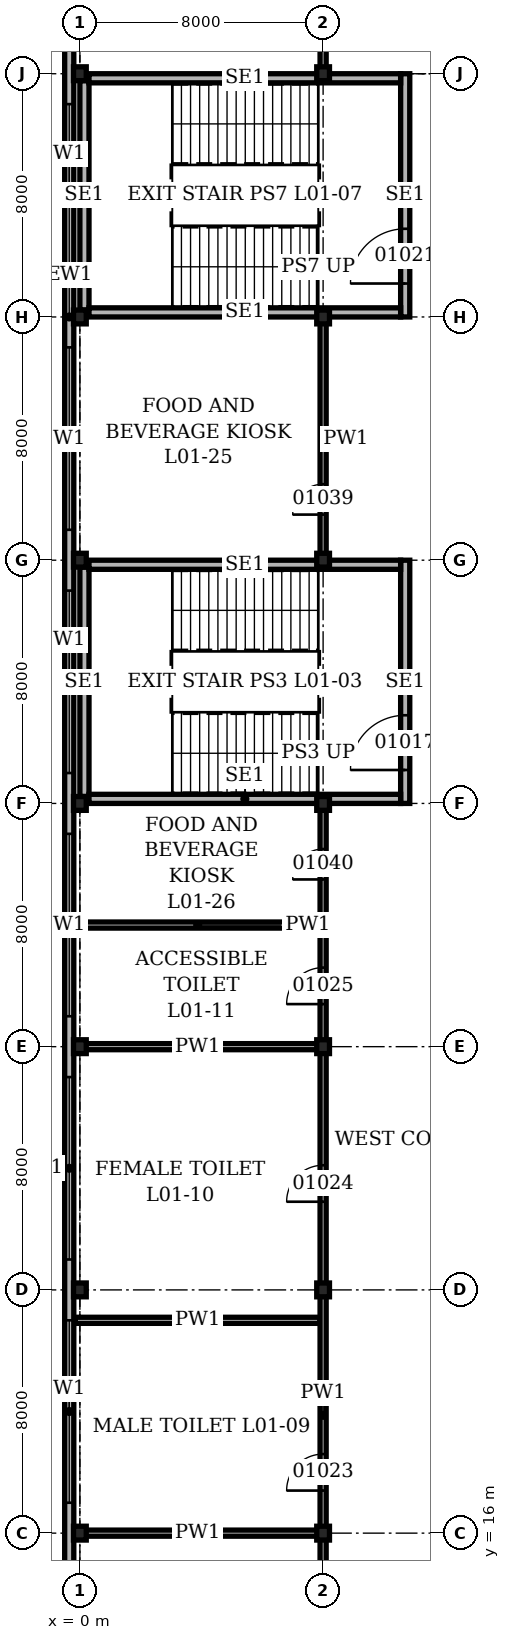
"""IFC4 building model, lengths in metres.
Left out: names, types, materials, properties, quantities, classifications, styles, units other than length and angle.
Written with IfcOpenShell. Run it as: python <this file> out.ifc"""

import sys

from ifc_helpers import new_model, si_unit, direction, frame, frame_2d, origin, origin_2d, place, context, subcontext, project, spatial, rectangle, i_section, extrude, element, fill, save


model = new_model("IFC4")
c1 = context("Model", 3, precision=1e-05, world=origin(), true_north=direction((0.0, 1.0)))
c2 = subcontext(c1, "Body", "Model", "MODEL_VIEW")
j1 = project(units=[si_unit("LENGTHUNIT", "METRE"), si_unit("PLANEANGLEUNIT", "RADIAN")], contexts=[c1])
p1 = place(None, origin())
s1 = spatial("IfcSite", under=j1, at=p1, CompositionType="ELEMENT")
p2 = place(p1, origin())
s2 = spatial("IfcBuilding", under=s1, at=p2, CompositionType="ELEMENT")
p3 = place(p2, frame((0.0, 0.0, 4.9)))
s3 = spatial("IfcBuildingStorey", under=s2, at=p3, CompositionType="ELEMENT", Elevation=4.9)
for number, where, z_axis, x_axis in (
    (1, (0.0, 16.0, 0.0), (0.0, 0.0, 1.0), (1.0, 0.0, 0.0)),
    (2, (0.0, 24.0, 0.0), (0.0, 0.0, 1.0), (1.0, 0.0, 0.0)),
    (3, (0.0, 32.0, 0.0), (0.0, 0.0, 1.0), (1.0, 0.0, 0.0)),
    (4, (0.0, 40.0, 0.0), (0.0, 0.0, 1.0), (1.0, 0.0, 0.0)),
    (5, (0.0, 48.0, 0.0), (0.0, 0.0, 1.0), (1.0, 0.0, 0.0)),
    (6, (0.0, 56.0, 0.0), (0.0, 0.0, 1.0), (1.0, 0.0, 0.0)),
    (7, (0.0, 64.0, 0.0), (0.0, 0.0, 1.0), (1.0, 0.0, 0.0)),
    (8, (8.0, 16.0, 0.0), (0.0, 0.0, 1.0), (1.0, 0.0, 0.0)),
    (9, (8.0, 24.0, 0.0), (0.0, 0.0, 1.0), (1.0, 0.0, 0.0)),
    (10, (8.0, 32.0, 0.0), (0.0, 0.0, 1.0), (1.0, 0.0, 0.0)),
    (11, (8.0, 40.0, 0.0), (0.0, 0.0, 1.0), (1.0, 0.0, 0.0)),
    (12, (8.0, 48.0, 0.0), (0.0, 0.0, 1.0), (1.0, 0.0, 0.0)),
    (13, (8.0, 56.0, 0.0), (0.0, 0.0, 1.0), (1.0, 0.0, 0.0)),
    (14, (8.0, 64.0, 0.0), (0.0, 0.0, 1.0), (1.0, 0.0, 0.0)),
):
    element("IfcColumn", number, at=place(p3, frame(where, z_axis=z_axis, x_axis=x_axis)), inside=s3, PredefinedType="COLUMN", context=c2, shape_type="SweptSolid", body=[
        extrude(i_section(OverallWidth=0.419, OverallDepth=0.455, WebThickness=0.042, FlangeThickness=0.068, at=origin_2d()), origin(), (0.0, 0.0, 1.0), 5.0),
    ])
p4 = place(p3, frame((-0.35, 112.35, 0.0), z_axis=(0.0, 0.0, 1.0), x_axis=(0.0, -1.0, 0.0)))
e15 = element("IfcWall", 15, at=p4, inside=s3, PredefinedType="SOLIDWALL", context=c2, shape_type="SweptSolid", body=[
    extrude(rectangle(XDim=112.7, YDim=0.3, at=frame_2d((56.35, 0.0))), origin(), (0.0, 0.0, 1.0), 5.0),
])
p5 = place(p4, frame((1.35, 0.0, 1.0)))
e16 = element("IfcOpeningElement", 16, at=p5, cuts=e15, PredefinedType="OPENING", context=c2, shape_type="SweptSolid", body=[
    extrude(rectangle(XDim=6.0, YDim=1.5, at=frame_2d((3.0, 0.75))), frame((0.0, 0.16, 0.0), z_axis=(0.0, -1.0, 0.0), x_axis=(1.0, 0.0, 0.0)), (0.0, 0.0, 1.0), 0.32),
])
p6 = place(p4, frame((9.35, 0.0, 1.0)))
e17 = element("IfcOpeningElement", 17, at=p6, cuts=e15, PredefinedType="OPENING", context=c2, shape_type="SweptSolid", body=[
    extrude(rectangle(XDim=6.0, YDim=1.5, at=frame_2d((3.0, 0.75))), frame((0.0, 0.16, 0.0), z_axis=(0.0, -1.0, 0.0), x_axis=(1.0, 0.0, 0.0)), (0.0, 0.0, 1.0), 0.32),
])
p7 = place(p4, frame((17.35, 0.0, 1.0)))
e18 = element("IfcOpeningElement", 18, at=p7, cuts=e15, PredefinedType="OPENING", context=c2, shape_type="SweptSolid", body=[
    extrude(rectangle(XDim=6.0, YDim=1.5, at=frame_2d((3.0, 0.75))), frame((0.0, 0.16, 0.0), z_axis=(0.0, -1.0, 0.0), x_axis=(1.0, 0.0, 0.0)), (0.0, 0.0, 1.0), 0.32),
])
p8 = place(p4, frame((25.35, 0.0, 1.0)))
e19 = element("IfcOpeningElement", 19, at=p8, cuts=e15, PredefinedType="OPENING", context=c2, shape_type="SweptSolid", body=[
    extrude(rectangle(XDim=6.0, YDim=1.5, at=frame_2d((3.0, 0.75))), frame((0.0, 0.16, 0.0), z_axis=(0.0, -1.0, 0.0), x_axis=(1.0, 0.0, 0.0)), (0.0, 0.0, 1.0), 0.32),
])
p9 = place(p4, frame((33.35, 0.0, 1.0)))
e20 = element("IfcOpeningElement", 20, at=p9, cuts=e15, PredefinedType="OPENING", context=c2, shape_type="SweptSolid", body=[
    extrude(rectangle(XDim=6.0, YDim=1.5, at=frame_2d((3.0, 0.75))), frame((0.0, 0.16, 0.0), z_axis=(0.0, -1.0, 0.0), x_axis=(1.0, 0.0, 0.0)), (0.0, 0.0, 1.0), 0.32),
])
p10 = place(p4, frame((41.35, 0.0, 1.0)))
e21 = element("IfcOpeningElement", 21, at=p10, cuts=e15, PredefinedType="OPENING", context=c2, shape_type="SweptSolid", body=[
    extrude(rectangle(XDim=6.0, YDim=1.5, at=frame_2d((3.0, 0.75))), frame((0.0, 0.16, 0.0), z_axis=(0.0, -1.0, 0.0), x_axis=(1.0, 0.0, 0.0)), (0.0, 0.0, 1.0), 0.32),
])
p11 = place(p4, frame((49.35, 0.0, 1.0)))
e22 = element("IfcOpeningElement", 22, at=p11, cuts=e15, PredefinedType="OPENING", context=c2, shape_type="SweptSolid", body=[
    extrude(rectangle(XDim=6.0, YDim=1.5, at=frame_2d((3.0, 0.75))), frame((0.0, 0.16, 0.0), z_axis=(0.0, -1.0, 0.0), x_axis=(1.0, 0.0, 0.0)), (0.0, 0.0, 1.0), 0.32),
])
p12 = place(p4, frame((57.35, 0.0, 1.0)))
e23 = element("IfcOpeningElement", 23, at=p12, cuts=e15, PredefinedType="OPENING", context=c2, shape_type="SweptSolid", body=[
    extrude(rectangle(XDim=6.0, YDim=1.5, at=frame_2d((3.0, 0.75))), frame((0.0, 0.16, 0.0), z_axis=(0.0, -1.0, 0.0), x_axis=(1.0, 0.0, 0.0)), (0.0, 0.0, 1.0), 0.32),
])
p13 = place(p4, frame((65.35, 0.0, 1.0)))
e24 = element("IfcOpeningElement", 24, at=p13, cuts=e15, PredefinedType="OPENING", context=c2, shape_type="SweptSolid", body=[
    extrude(rectangle(XDim=6.0, YDim=1.5, at=frame_2d((3.0, 0.75))), frame((0.0, 0.16, 0.0), z_axis=(0.0, -1.0, 0.0), x_axis=(1.0, 0.0, 0.0)), (0.0, 0.0, 1.0), 0.32),
])
p14 = place(p4, frame((73.35, 0.0, 1.0)))
e25 = element("IfcOpeningElement", 25, at=p14, cuts=e15, PredefinedType="OPENING", context=c2, shape_type="SweptSolid", body=[
    extrude(rectangle(XDim=6.0, YDim=1.5, at=frame_2d((3.0, 0.75))), frame((0.0, 0.16, 0.0), z_axis=(0.0, -1.0, 0.0), x_axis=(1.0, 0.0, 0.0)), (0.0, 0.0, 1.0), 0.32),
])
p15 = place(p4, frame((81.35, 0.0, 1.0)))
e26 = element("IfcOpeningElement", 26, at=p15, cuts=e15, PredefinedType="OPENING", context=c2, shape_type="SweptSolid", body=[
    extrude(rectangle(XDim=6.0, YDim=1.5, at=frame_2d((3.0, 0.75))), frame((0.0, 0.16, 0.0), z_axis=(0.0, -1.0, 0.0), x_axis=(1.0, 0.0, 0.0)), (0.0, 0.0, 1.0), 0.32),
])
p16 = place(p4, frame((89.35, 0.0, 1.0)))
e27 = element("IfcOpeningElement", 27, at=p16, cuts=e15, PredefinedType="OPENING", context=c2, shape_type="SweptSolid", body=[
    extrude(rectangle(XDim=6.0, YDim=1.5, at=frame_2d((3.0, 0.75))), frame((0.0, 0.16, 0.0), z_axis=(0.0, -1.0, 0.0), x_axis=(1.0, 0.0, 0.0)), (0.0, 0.0, 1.0), 0.32),
])
p17 = place(p4, frame((97.35, 0.0, 1.0)))
e28 = element("IfcOpeningElement", 28, at=p17, cuts=e15, PredefinedType="OPENING", context=c2, shape_type="SweptSolid", body=[
    extrude(rectangle(XDim=6.0, YDim=1.5, at=frame_2d((3.0, 0.75))), frame((0.0, 0.16, 0.0), z_axis=(0.0, -1.0, 0.0), x_axis=(1.0, 0.0, 0.0)), (0.0, 0.0, 1.0), 0.32),
])
p18 = place(p4, frame((105.35, 0.0, 1.0)))
e29 = element("IfcOpeningElement", 29, at=p18, cuts=e15, PredefinedType="OPENING", context=c2, shape_type="SweptSolid", body=[
    extrude(rectangle(XDim=6.0, YDim=1.5, at=frame_2d((3.0, 0.75))), frame((0.0, 0.16, 0.0), z_axis=(0.0, -1.0, 0.0), x_axis=(1.0, 0.0, 0.0)), (0.0, 0.0, 1.0), 0.32),
])
p19 = place(p3, frame((0.15, 40.227, 0.0), z_axis=(0.0, 0.0, 1.0), x_axis=(0.0, 1.0, 0.0)))
e30 = element("IfcWall", 30, at=p19, inside=s3, PredefinedType="SOLIDWALL", context=c2, shape_type="SweptSolid", body=[
    extrude(rectangle(XDim=7.545, YDim=0.3, at=frame_2d((3.773, 0.0))), origin(), (0.0, 0.0, 1.0), 4.8),
])
p20 = place(p3, frame((10.7, 40.0, 0.0), z_axis=(0.0, 0.0, 1.0), x_axis=(0.0, 1.0, 0.0)))
e31 = element("IfcWall", 31, at=p20, inside=s3, PredefinedType="SOLIDWALL", context=c2, shape_type="SweptSolid", body=[
    extrude(rectangle(XDim=8.0, YDim=0.3, at=frame_2d((4.0, 0.0))), origin(), (0.0, 0.0, 1.0), 4.8),
])
p21 = place(p20, frame((1.1, 0.0, 0.0)))
e32 = element("IfcOpeningElement", 32, at=p21, cuts=e31, PredefinedType="OPENING", context=c2, shape_type="SweptSolid", body=[
    extrude(rectangle(XDim=1.8, YDim=2.1, at=frame_2d((0.9, 1.05))), frame((0.0, 0.16, 0.0), z_axis=(0.0, -1.0, 0.0), x_axis=(1.0, 0.0, 0.0)), (0.0, 0.0, 1.0), 0.32),
])
for number, where, z_axis, x_axis in (
    (33, (0.3, 40.15, 0.0), (0.0, 0.0, 1.0), (1.0, 0.0, 0.0)),
    (34, (0.3, 47.85, 0.0), (0.0, 0.0, 1.0), (1.0, 0.0, 0.0)),
):
    element("IfcWall", number, at=place(p3, frame(where, z_axis=z_axis, x_axis=x_axis)), inside=s3, PredefinedType="SOLIDWALL", context=c2, shape_type="SweptSolid", body=[
        extrude(rectangle(XDim=10.25, YDim=0.3, at=frame_2d((5.125, 0.0))), origin(), (0.0, 0.0, 1.0), 4.8),
    ])
p22 = place(p3, frame((0.15, 56.227, 0.0), z_axis=(0.0, 0.0, 1.0), x_axis=(0.0, 1.0, 0.0)))
e35 = element("IfcWall", 35, at=p22, inside=s3, PredefinedType="SOLIDWALL", context=c2, shape_type="SweptSolid", body=[
    extrude(rectangle(XDim=7.545, YDim=0.3, at=frame_2d((3.773, 0.0))), origin(), (0.0, 0.0, 1.0), 4.8),
])
p23 = place(p3, frame((10.7, 56.0, 0.0), z_axis=(0.0, 0.0, 1.0), x_axis=(0.0, 1.0, 0.0)))
e36 = element("IfcWall", 36, at=p23, inside=s3, PredefinedType="SOLIDWALL", context=c2, shape_type="SweptSolid", body=[
    extrude(rectangle(XDim=8.0, YDim=0.3, at=frame_2d((4.0, 0.0))), origin(), (0.0, 0.0, 1.0), 4.8),
])
p24 = place(p23, frame((1.1, 0.0, 0.0)))
e37 = element("IfcOpeningElement", 37, at=p24, cuts=e36, PredefinedType="OPENING", context=c2, shape_type="SweptSolid", body=[
    extrude(rectangle(XDim=1.8, YDim=2.1, at=frame_2d((0.9, 1.05))), frame((0.0, 0.16, 0.0), z_axis=(0.0, -1.0, 0.0), x_axis=(1.0, 0.0, 0.0)), (0.0, 0.0, 1.0), 0.32),
])
for number, where, z_axis, x_axis in (
    (38, (0.3, 56.15, 0.0), (0.0, 0.0, 1.0), (1.0, 0.0, 0.0)),
    (39, (0.3, 63.85, 0.0), (0.0, 0.0, 1.0), (1.0, 0.0, 0.0)),
):
    element("IfcWall", number, at=place(p3, frame(where, z_axis=z_axis, x_axis=x_axis)), inside=s3, PredefinedType="SOLIDWALL", context=c2, shape_type="SweptSolid", body=[
        extrude(rectangle(XDim=10.25, YDim=0.3, at=frame_2d((5.125, 0.0))), origin(), (0.0, 0.0, 1.0), 4.8),
    ])
p25 = place(p3, frame((-0.15, 16.0, 0.0), z_axis=(0.0, 0.0, 1.0), x_axis=(1.0, 0.0, 0.0)))
e40 = element("IfcWall", 40, at=p25, inside=s3, PredefinedType="PARTITIONING", context=c2, shape_type="SweptSolid", body=[
    extrude(rectangle(XDim=8.05, YDim=0.2, at=frame_2d((4.025, 0.0))), origin(), (0.0, 0.0, 1.0), 4.028),
])
p26 = place(p3, frame((-0.15, 23.0, 0.0), z_axis=(0.0, 0.0, 1.0), x_axis=(1.0, 0.0, 0.0)))
e41 = element("IfcWall", 41, at=p26, inside=s3, PredefinedType="PARTITIONING", context=c2, shape_type="SweptSolid", body=[
    extrude(rectangle(XDim=8.05, YDim=0.2, at=frame_2d((4.025, 0.0))), origin(), (0.0, 0.0, 1.0), 4.8),
])
p27 = place(p3, frame((-0.15, 32.0, 0.0), z_axis=(0.0, 0.0, 1.0), x_axis=(1.0, 0.0, 0.0)))
e42 = element("IfcWall", 42, at=p27, inside=s3, PredefinedType="PARTITIONING", context=c2, shape_type="SweptSolid", body=[
    extrude(rectangle(XDim=8.05, YDim=0.2, at=frame_2d((4.025, 0.0))), origin(), (0.0, 0.0, 1.0), 4.028),
])
p28 = place(p3, frame((-0.15, 36.0, 0.0), z_axis=(0.0, 0.0, 1.0), x_axis=(1.0, 0.0, 0.0)))
e43 = element("IfcWall", 43, at=p28, inside=s3, PredefinedType="PARTITIONING", context=c2, shape_type="SweptSolid", body=[
    extrude(rectangle(XDim=8.05, YDim=0.2, at=frame_2d((4.025, 0.0))), origin(), (0.0, 0.0, 1.0), 4.8),
])
p29 = place(p3, frame((8.0, -0.15, 0.0), z_axis=(0.0, 0.0, 1.0), x_axis=(0.0, 1.0, 0.0)))
e44 = element("IfcWall", 44, at=p29, inside=s3, PredefinedType="PARTITIONING", context=c2, shape_type="SweptSolid", body=[
    extrude(rectangle(XDim=40.05, YDim=0.2, at=frame_2d((20.025, 0.0))), origin(), (0.0, 0.0, 1.0), 4.028),
])
p30 = place(p29, frame((17.55, 0.0, 0.0)))
e45 = element("IfcOpeningElement", 45, at=p30, cuts=e44, PredefinedType="OPENING", context=c2, shape_type="SweptSolid", body=[
    extrude(rectangle(XDim=1.2, YDim=2.1, at=frame_2d((0.6, 1.05))), frame((0.0, 0.11, 0.0), z_axis=(0.0, -1.0, 0.0), x_axis=(1.0, 0.0, 0.0)), (0.0, 0.0, 1.0), 0.22),
])
p31 = place(p29, frame((27.05, 0.0, 0.0)))
e46 = element("IfcOpeningElement", 46, at=p31, cuts=e44, PredefinedType="OPENING", context=c2, shape_type="SweptSolid", body=[
    extrude(rectangle(XDim=1.2, YDim=2.1, at=frame_2d((0.6, 1.05))), frame((0.0, 0.11, 0.0), z_axis=(0.0, -1.0, 0.0), x_axis=(1.0, 0.0, 0.0)), (0.0, 0.0, 1.0), 0.22),
])
p32 = place(p29, frame((33.55, 0.0, 0.0)))
e47 = element("IfcOpeningElement", 47, at=p32, cuts=e44, PredefinedType="OPENING", context=c2, shape_type="SweptSolid", body=[
    extrude(rectangle(XDim=1.2, YDim=2.1, at=frame_2d((0.6, 1.05))), frame((0.0, 0.11, 0.0), z_axis=(0.0, -1.0, 0.0), x_axis=(1.0, 0.0, 0.0)), (0.0, 0.0, 1.0), 0.22),
])
p33 = place(p29, frame((1.65, 0.0, 0.0)))
e48 = element("IfcOpeningElement", 48, at=p33, cuts=e44, PredefinedType="OPENING", context=c2, shape_type="SweptSolid", body=[
    extrude(rectangle(XDim=1.0, YDim=2.1, at=frame_2d((0.5, 1.05))), frame((0.0, 0.11, 0.0), z_axis=(0.0, -1.0, 0.0), x_axis=(1.0, 0.0, 0.0)), (0.0, 0.0, 1.0), 0.22),
])
p34 = place(p29, frame((37.65, 0.0, 0.0)))
e49 = element("IfcOpeningElement", 49, at=p34, cuts=e44, PredefinedType="OPENING", context=c2, shape_type="SweptSolid", body=[
    extrude(rectangle(XDim=1.0, YDim=2.1, at=frame_2d((0.5, 1.05))), frame((0.0, 0.11, 0.0), z_axis=(0.0, -1.0, 0.0), x_axis=(1.0, 0.0, 0.0)), (0.0, 0.0, 1.0), 0.22),
])
p35 = place(p3, frame((8.0, 48.1, 0.0), z_axis=(0.0, 0.0, 1.0), x_axis=(0.0, 1.0, 0.0)))
e50 = element("IfcWall", 50, at=p35, inside=s3, PredefinedType="PARTITIONING", context=c2, shape_type="SweptSolid", body=[
    extrude(rectangle(XDim=7.8, YDim=0.2, at=frame_2d((3.9, 0.0))), origin(), (0.0, 0.0, 1.0), 4.028),
])
p36 = place(p35, frame((1.4, 0.0, 0.0)))
e51 = element("IfcOpeningElement", 51, at=p36, cuts=e50, PredefinedType="OPENING", context=c2, shape_type="SweptSolid", body=[
    extrude(rectangle(XDim=1.0, YDim=2.1, at=frame_2d((0.5, 1.05))), frame((0.0, 0.11, 0.0), z_axis=(0.0, -1.0, 0.0), x_axis=(1.0, 0.0, 0.0)), (0.0, 0.0, 1.0), 0.22),
])
p37 = place(p3, frame((8.0, 64.1, 0.0), z_axis=(0.0, 0.0, 1.0), x_axis=(0.0, 1.0, 0.0)))
e52 = element("IfcWall", 52, at=p37, inside=s3, PredefinedType="PARTITIONING", context=c2, shape_type="SweptSolid", body=[
    extrude(rectangle(XDim=7.8, YDim=0.2, at=frame_2d((3.9, 0.0))), origin(), (0.0, 0.0, 1.0), 4.028),
])
p38 = place(p37, frame((1.4, 0.0, 0.0)))
e53 = element("IfcOpeningElement", 53, at=p38, cuts=e52, PredefinedType="OPENING", context=c2, shape_type="SweptSolid", body=[
    extrude(rectangle(XDim=1.0, YDim=2.1, at=frame_2d((0.5, 1.05))), frame((0.0, 0.11, 0.0), z_axis=(0.0, -1.0, 0.0), x_axis=(1.0, 0.0, 0.0)), (0.0, 0.0, 1.0), 0.22),
])
p39 = place(p11, origin())
e54 = element("IfcWindow", 54, at=p39, inside=s3, PartitioningType="SINGLE_PANEL", PredefinedType="WINDOW", context=c2, shape_type="SweptSolid", body=[
    extrude(rectangle(XDim=6.0, YDim=1.5, at=frame_2d((3.0, 0.75))), frame((0.0, 0.03, 0.0), z_axis=(0.0, -1.0, 0.0), x_axis=(1.0, 0.0, 0.0)), (0.0, 0.0, 1.0), 0.06),
])
fill(e22, e54)
p40 = place(p12, origin())
e55 = element("IfcWindow", 55, at=p40, inside=s3, PartitioningType="SINGLE_PANEL", PredefinedType="WINDOW", context=c2, shape_type="SweptSolid", body=[
    extrude(rectangle(XDim=6.0, YDim=1.5, at=frame_2d((3.0, 0.75))), frame((0.0, 0.03, 0.0), z_axis=(0.0, -1.0, 0.0), x_axis=(1.0, 0.0, 0.0)), (0.0, 0.0, 1.0), 0.06),
])
fill(e23, e55)
p41 = place(p13, origin())
e56 = element("IfcWindow", 56, at=p41, inside=s3, PartitioningType="SINGLE_PANEL", PredefinedType="WINDOW", context=c2, shape_type="SweptSolid", body=[
    extrude(rectangle(XDim=6.0, YDim=1.5, at=frame_2d((3.0, 0.75))), frame((0.0, 0.03, 0.0), z_axis=(0.0, -1.0, 0.0), x_axis=(1.0, 0.0, 0.0)), (0.0, 0.0, 1.0), 0.06),
])
fill(e24, e56)
p42 = place(p14, origin())
e57 = element("IfcWindow", 57, at=p42, inside=s3, PartitioningType="SINGLE_PANEL", PredefinedType="WINDOW", context=c2, shape_type="SweptSolid", body=[
    extrude(rectangle(XDim=6.0, YDim=1.5, at=frame_2d((3.0, 0.75))), frame((0.0, 0.03, 0.0), z_axis=(0.0, -1.0, 0.0), x_axis=(1.0, 0.0, 0.0)), (0.0, 0.0, 1.0), 0.06),
])
fill(e25, e57)
p43 = place(p15, origin())
e58 = element("IfcWindow", 58, at=p43, inside=s3, PartitioningType="SINGLE_PANEL", PredefinedType="WINDOW", context=c2, shape_type="SweptSolid", body=[
    extrude(rectangle(XDim=6.0, YDim=1.5, at=frame_2d((3.0, 0.75))), frame((0.0, 0.03, 0.0), z_axis=(0.0, -1.0, 0.0), x_axis=(1.0, 0.0, 0.0)), (0.0, 0.0, 1.0), 0.06),
])
fill(e26, e58)
p44 = place(p16, origin())
e59 = element("IfcWindow", 59, at=p44, inside=s3, PartitioningType="SINGLE_PANEL", PredefinedType="WINDOW", context=c2, shape_type="SweptSolid", body=[
    extrude(rectangle(XDim=6.0, YDim=1.5, at=frame_2d((3.0, 0.75))), frame((0.0, 0.03, 0.0), z_axis=(0.0, -1.0, 0.0), x_axis=(1.0, 0.0, 0.0)), (0.0, 0.0, 1.0), 0.06),
])
fill(e27, e59)
p45 = place(p21, origin())
e60 = element("IfcDoor", 60, at=p45, inside=s3, OperationType="DOUBLE_DOOR_SINGLE_SWING", PredefinedType="DOOR", context=c2, shape_type="SweptSolid", body=[
    extrude(rectangle(XDim=1.8, YDim=2.1, at=frame_2d((0.9, 1.05))), frame((0.0, 0.15, 0.0), z_axis=(0.0, -1.0, 0.0), x_axis=(1.0, 0.0, 0.0)), (0.0, 0.0, 1.0), 0.3),
])
fill(e32, e60)
p46 = place(p24, origin())
e61 = element("IfcDoor", 61, at=p46, inside=s3, OperationType="DOUBLE_DOOR_SINGLE_SWING", PredefinedType="DOOR", context=c2, shape_type="SweptSolid", body=[
    extrude(rectangle(XDim=1.8, YDim=2.1, at=frame_2d((0.9, 1.05))), frame((0.0, 0.15, 0.0), z_axis=(0.0, -1.0, 0.0), x_axis=(1.0, 0.0, 0.0)), (0.0, 0.0, 1.0), 0.3),
])
fill(e37, e61)
p47 = place(p30, origin())
e62 = element("IfcDoor", 62, at=p47, inside=s3, OperationType="SINGLE_SWING_RIGHT", PredefinedType="DOOR", context=c2, shape_type="SweptSolid", body=[
    extrude(rectangle(XDim=1.2, YDim=2.1, at=frame_2d((0.6, 1.05))), frame((0.0, 0.1, 0.0), z_axis=(0.0, -1.0, 0.0), x_axis=(1.0, 0.0, 0.0)), (0.0, 0.0, 1.0), 0.199),
])
fill(e45, e62)
p48 = place(p31, origin())
e63 = element("IfcDoor", 63, at=p48, inside=s3, OperationType="SINGLE_SWING_RIGHT", PredefinedType="DOOR", context=c2, shape_type="SweptSolid", body=[
    extrude(rectangle(XDim=1.2, YDim=2.1, at=frame_2d((0.6, 1.05))), frame((0.0, 0.1, 0.0), z_axis=(0.0, -1.0, 0.0), x_axis=(1.0, 0.0, 0.0)), (0.0, 0.0, 1.0), 0.199),
])
fill(e46, e63)
p49 = place(p32, origin())
e64 = element("IfcDoor", 64, at=p49, inside=s3, OperationType="SINGLE_SWING_RIGHT", PredefinedType="DOOR", context=c2, shape_type="SweptSolid", body=[
    extrude(rectangle(XDim=1.2, YDim=2.1, at=frame_2d((0.6, 1.05))), frame((0.0, 0.1, 0.0), z_axis=(0.0, -1.0, 0.0), x_axis=(1.0, 0.0, 0.0)), (0.0, 0.0, 1.0), 0.199),
])
fill(e47, e64)
p50 = place(p36, origin())
e65 = element("IfcDoor", 65, at=p50, inside=s3, OperationType="SINGLE_SWING_LEFT", PredefinedType="DOOR", context=c2, shape_type="SweptSolid", body=[
    extrude(rectangle(XDim=1.0, YDim=2.1, at=frame_2d((0.5, 1.05))), frame((0.0, 0.1, 0.0), z_axis=(0.0, -1.0, 0.0), x_axis=(1.0, 0.0, 0.0)), (0.0, 0.0, 1.0), 0.199),
])
fill(e51, e65)
p51 = place(p34, origin())
e66 = element("IfcDoor", 66, at=p51, inside=s3, OperationType="SINGLE_SWING_LEFT", PredefinedType="DOOR", context=c2, shape_type="SweptSolid", body=[
    extrude(rectangle(XDim=1.0, YDim=2.1, at=frame_2d((0.5, 1.05))), frame((0.0, 0.1, 0.0), z_axis=(0.0, -1.0, 0.0), x_axis=(1.0, 0.0, 0.0)), (0.0, 0.0, 1.0), 0.199),
])
fill(e49, e66)
save(model, sys.argv[1])
